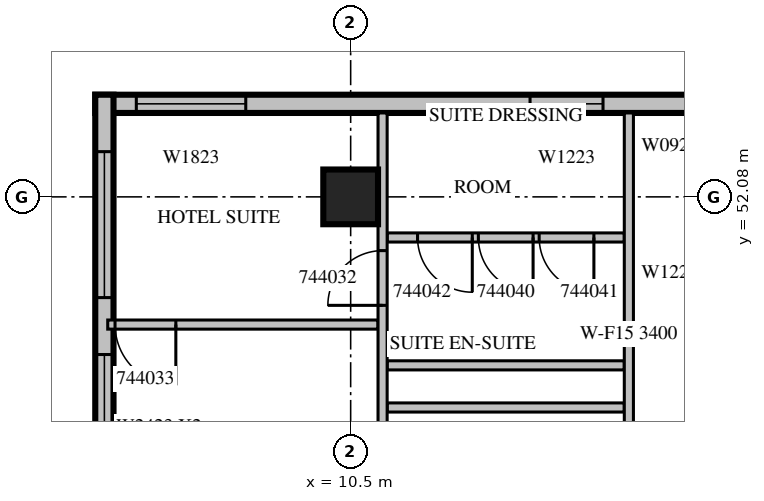
"""IFC4 building model, lengths in metres.
Left out: names, types, materials, properties, quantities, classifications, styles, units other than length and angle.
Written with IfcOpenShell. Run it as: python <this file> out.ifc"""

import sys

from ifc_helpers import new_model, si_unit, direction, frame, frame_2d, origin, origin_2d, place, context, subcontext, project, spatial, rectangle, extrude, source, transform, mapped, element, fill, save


model = new_model("IFC4")
c1 = context("Model", 3, precision=1e-05, world=origin(), true_north=direction((0.0, 1.0)))
c2 = subcontext(c1, "Body", "Model", "MODEL_VIEW")
j1 = project(units=[si_unit("LENGTHUNIT", "METRE"), si_unit("PLANEANGLEUNIT", "RADIAN")], contexts=[c1])
p1 = place(None, origin())
s1 = spatial("IfcSite", under=j1, at=p1, CompositionType="ELEMENT")
p2 = place(p1, origin())
s2 = spatial("IfcBuilding", under=s1, at=p2, CompositionType="ELEMENT")
p3 = place(p2, frame((0.0, 0.0, 200.6)))
s3 = spatial("IfcBuildingStorey", under=s2, at=p3, CompositionType="ELEMENT", Elevation=200.6)
m1 = source(origin(), c2, "Body", "SweptSolid", [
    extrude(rectangle(XDim=0.9, YDim=0.9, at=origin_2d()), origin(), (0.0, 0.0, 1.0), 3.8),
])
p4 = place(p3, frame((10.5, 52.08, 0.0), z_axis=(0.0, 0.0, 1.0), x_axis=(1.0, 0.0, 0.0)))
e1 = element("IfcColumn", 1, at=p4, inside=s3, PredefinedType="COLUMN", context=c2, shape_type="MappedRepresentation", body=[
    mapped(m1, transform((0.0, 0.0, 0.0), scale=1.0)),
])
m2 = source(origin(), c2, "Body", "SweptSolid", [
    extrude(rectangle(XDim=10.5, YDim=0.3, at=frame_2d((5.25, 0.0))), origin(), (0.0, 0.0, 1.0), 3.4),
])
p5 = place(p3, frame((16.8, 53.61, 0.0), z_axis=(0.0, 0.0, 1.0), x_axis=(-1.0, 0.0, 0.0)))
e2 = element("IfcWall", 2, at=p5, inside=s3, PredefinedType="STANDARD", context=c2, shape_type="MappedRepresentation", body=[
    mapped(m2, transform((0.0, 0.0, 0.0), scale=1.0)),
])
m3 = source(origin(), c2, "Body", "SweptSolid", [
    extrude(rectangle(XDim=1.2, YDim=2.3, at=frame_2d((0.6, 1.15))), frame((0.0, 0.16, 0.0), z_axis=(0.0, -1.0, 0.0), x_axis=(1.0, 0.0, 0.0)), (0.0, 0.0, 1.0), 0.32),
])
p6 = place(p5, frame((2.15, 0.0, 0.6)))
e3 = element("IfcOpeningElement", 3, at=p6, cuts=e2, PredefinedType="OPENING", context=c2, shape_type="MappedRepresentation", body=[
    mapped(m3, transform((0.0, 0.0, 0.0), scale=1.0)),
])
m4 = source(origin(), c2, "Body", "SweptSolid", [
    extrude(rectangle(XDim=1.8, YDim=2.3, at=frame_2d((0.9, 1.15))), frame((0.0, 0.16, 0.0), z_axis=(0.0, -1.0, 0.0), x_axis=(1.0, 0.0, 0.0)), (0.0, 0.0, 1.0), 0.32),
])
p7 = place(p5, frame((8.025, 0.0, 0.6)))
e4 = element("IfcOpeningElement", 4, at=p7, cuts=e2, PredefinedType="OPENING", context=c2, shape_type="MappedRepresentation", body=[
    mapped(m4, transform((0.0, 0.0, 0.0), scale=1.0)),
])
m5 = source(origin(), c2, "Body", "SweptSolid", [
    extrude(rectangle(XDim=9.91, YDim=0.3, at=frame_2d((4.955, 0.0))), origin(), (0.0, 0.0, 1.0), 3.4),
])
p8 = place(p3, frame((6.45, 53.76, 0.0), z_axis=(0.0, 0.0, 1.0), x_axis=(0.0, -1.0, 0.0)))
e5 = element("IfcWall", 5, at=p8, inside=s3, PredefinedType="STANDARD", context=c2, shape_type="MappedRepresentation", body=[
    mapped(m5, transform((0.0, 0.0, 0.0), scale=1.0)),
])
m6 = source(origin(), c2, "Body", "SweptSolid", [
    extrude(rectangle(XDim=2.4, YDim=2.3, at=frame_2d((1.2, 1.15))), frame((0.0, 0.16, 0.0), z_axis=(0.0, -1.0, 0.0), x_axis=(1.0, 0.0, 0.0)), (0.0, 0.0, 1.0), 0.32),
])
p9 = place(p8, frame((4.272, 0.0, 0.6)))
e6 = element("IfcOpeningElement", 6, at=p9, cuts=e5, PredefinedType="OPENING", context=c2, shape_type="MappedRepresentation", body=[
    mapped(m6, transform((0.0, 0.0, 0.0), scale=1.0)),
])
p10 = place(p8, frame((0.936, 0.0, 0.6)))
e7 = element("IfcOpeningElement", 7, at=p10, cuts=e5, PredefinedType="OPENING", context=c2, shape_type="MappedRepresentation", body=[
    mapped(m6, transform((0.0, 0.0, 0.0), scale=1.0)),
])
m7 = source(origin(), c2, "Body", "SweptSolid", [
    extrude(rectangle(XDim=4.445, YDim=0.15, at=frame_2d((2.223, 0.0))), origin(), (0.0, 0.0, 1.0), 3.4),
])
p11 = place(p3, frame((10.95, 49.98, 0.0), z_axis=(0.0, 0.0, 1.0), x_axis=(-1.0, 0.0, 0.0)))
e8 = element("IfcWall", 8, at=p11, inside=s3, PredefinedType="PARTITIONING", context=c2, shape_type="MappedRepresentation", body=[
    mapped(m7, transform((0.0, 0.0, 0.0), scale=1.0)),
])
m8 = source(origin(), c2, "Body", "SweptSolid", [
    extrude(rectangle(XDim=1.0, YDim=2.1, at=frame_2d((0.5, 1.05))), frame((0.0, 0.085, 0.0), z_axis=(0.0, -1.0, 0.0), x_axis=(1.0, 0.0, 0.0)), (0.0, 0.0, 1.0), 0.17),
])
p12 = place(p11, frame((3.325, 0.0, 0.0)))
e9 = element("IfcOpeningElement", 9, at=p12, cuts=e8, PredefinedType="OPENING", context=c2, shape_type="MappedRepresentation", body=[
    mapped(m8, transform((0.0, 0.0, 0.0), scale=1.0)),
])
m9 = source(origin(), c2, "Body", "SweptSolid", [
    extrude(rectangle(XDim=3.9, YDim=0.15, at=frame_2d((1.95, 0.0))), origin(), (0.0, 0.0, 1.0), 3.4),
])
for number, where, z_axis, x_axis in (
    (10, (15.0, 48.617, 0.0), (0.0, 0.0, 1.0), (-1.0, 0.0, 0.0)),
    (11, (15.0, 49.309, 0.0), (0.0, 0.0, 1.0), (-1.0, 0.0, 0.0)),
):
    element("IfcWall", number, at=place(p3, frame(where, z_axis=z_axis, x_axis=x_axis)), inside=s3, PredefinedType="PARTITIONING", context=c2, shape_type="MappedRepresentation", body=[
        mapped(m9, transform((0.0, 0.0, 0.0), scale=1.0)),
    ])
p13 = place(p3, frame((15.0, 51.412, 0.0), z_axis=(0.0, 0.0, 1.0), x_axis=(-1.0, 0.0, 0.0)))
e12 = element("IfcWall", 12, at=p13, inside=s3, PredefinedType="PARTITIONING", context=c2, shape_type="MappedRepresentation", body=[
    mapped(m9, transform((0.0, 0.0, 0.0), scale=1.0)),
])
m10 = source(origin(), c2, "Body", "SweptSolid", [
    extrude(rectangle(XDim=0.9, YDim=2.1, at=frame_2d((0.45, 1.05))), frame((0.0, 0.085, 0.0), z_axis=(0.0, -1.0, 0.0), x_axis=(1.0, 0.0, 0.0)), (0.0, 0.0, 1.0), 0.17),
])
p14 = place(p13, frame((1.5, 0.0, 0.0)))
e13 = element("IfcOpeningElement", 13, at=p14, cuts=e12, PredefinedType="OPENING", context=c2, shape_type="MappedRepresentation", body=[
    mapped(m10, transform((0.0, 0.0, 0.0), scale=1.0)),
])
p15 = place(p13, frame((0.5, 0.0, 0.0)))
e14 = element("IfcOpeningElement", 14, at=p15, cuts=e12, PredefinedType="OPENING", context=c2, shape_type="MappedRepresentation", body=[
    mapped(m10, transform((0.0, 0.0, 0.0), scale=1.0)),
])
p16 = place(p13, frame((2.5, 0.0, 0.0)))
e15 = element("IfcOpeningElement", 15, at=p16, cuts=e12, PredefinedType="OPENING", context=c2, shape_type="MappedRepresentation", body=[
    mapped(m10, transform((0.0, 0.0, 0.0), scale=1.0)),
])
m11 = source(origin(), c2, "Body", "SweptSolid", [
    extrude(rectangle(XDim=7.26, YDim=0.15, at=frame_2d((3.63, 0.0))), origin(), (0.0, 0.0, 1.0), 3.4),
])
p17 = place(p3, frame((11.025, 46.2, 0.0), z_axis=(0.0, 0.0, 1.0), x_axis=(0.0, 1.0, 0.0)))
e16 = element("IfcWall", 16, at=p17, inside=s3, PredefinedType="PARTITIONING", context=c2, shape_type="MappedRepresentation", body=[
    mapped(m11, transform((0.0, 0.0, 0.0), scale=1.0)),
])
m12 = source(origin(), c2, "Body", "SweptSolid", [
    extrude(rectangle(XDim=1.1, YDim=2.1, at=frame_2d((0.55, 1.05))), frame((0.0, 0.085, 0.0), z_axis=(0.0, -1.0, 0.0), x_axis=(1.0, 0.0, 0.0)), (0.0, 0.0, 1.0), 0.17),
])
p18 = place(p17, frame((0.896, 0.0, 0.0)))
e17 = element("IfcOpeningElement", 17, at=p18, cuts=e16, PredefinedType="OPENING", context=c2, shape_type="MappedRepresentation", body=[
    mapped(m12, transform((0.0, 0.0, 0.0), scale=1.0)),
])
p19 = place(p17, frame((4.096, 0.0, 0.0)))
e18 = element("IfcOpeningElement", 18, at=p19, cuts=e16, PredefinedType="OPENING", context=c2, shape_type="MappedRepresentation", body=[
    mapped(m10, transform((0.0, 0.0, 0.0), scale=1.0)),
])
p20 = place(p3, frame((15.075, 46.2, 0.0), z_axis=(0.0, 0.0, 1.0), x_axis=(0.0, 1.0, 0.0)))
e19 = element("IfcWall", 19, at=p20, inside=s3, PredefinedType="PARTITIONING", context=c2, shape_type="MappedRepresentation", body=[
    mapped(m11, transform((0.0, 0.0, 0.0), scale=1.0)),
])
p21 = place(p20, frame((0.658, 0.0, 0.0)))
e20 = element("IfcOpeningElement", 20, at=p21, cuts=e19, PredefinedType="OPENING", context=c2, shape_type="MappedRepresentation", body=[
    mapped(m12, transform((0.0, 0.0, 0.0), scale=1.0)),
])
m13 = source(origin(), c2, "Body", "SweptSolid", [
    extrude(rectangle(XDim=1.2, YDim=2.3, at=frame_2d((0.6, 1.15))), frame((0.0, 0.03, 0.0), z_axis=(0.0, -1.0, 0.0), x_axis=(1.0, 0.0, 0.0)), (0.0, 0.0, 1.0), 0.06),
])
p22 = place(p6, origin())
e21 = element("IfcWindow", 21, at=p22, inside=s3, PartitioningType="SINGLE_PANEL", PredefinedType="WINDOW", context=c2, shape_type="MappedRepresentation", body=[
    mapped(m13, transform((0.0, 0.0, 0.0), scale=1.0)),
])
fill(e3, e21)
m14 = source(origin(), c2, "Body", "SweptSolid", [
    extrude(rectangle(XDim=1.8, YDim=2.3, at=frame_2d((0.9, 1.15))), frame((0.0, 0.03, 0.0), z_axis=(0.0, -1.0, 0.0), x_axis=(1.0, 0.0, 0.0)), (0.0, 0.0, 1.0), 0.06),
])
p23 = place(p7, origin())
e22 = element("IfcWindow", 22, at=p23, inside=s3, PartitioningType="SINGLE_PANEL", PredefinedType="WINDOW", context=c2, shape_type="MappedRepresentation", body=[
    mapped(m14, transform((0.0, 0.0, 0.0), scale=1.0)),
])
fill(e4, e22)
m15 = source(origin(), c2, "Body", "SweptSolid", [
    extrude(rectangle(XDim=2.4, YDim=2.3, at=frame_2d((1.2, 1.15))), frame((0.0, 0.03, 0.0), z_axis=(0.0, -1.0, 0.0), x_axis=(1.0, 0.0, 0.0)), (0.0, 0.0, 1.0), 0.06),
])
p24 = place(p9, origin())
e23 = element("IfcWindow", 23, at=p24, inside=s3, PartitioningType="SINGLE_PANEL", PredefinedType="WINDOW", context=c2, shape_type="MappedRepresentation", body=[
    mapped(m15, transform((0.0, 0.0, 0.0), scale=1.0)),
])
fill(e6, e23)
p25 = place(p10, origin())
e24 = element("IfcWindow", 24, at=p25, inside=s3, PartitioningType="SINGLE_PANEL", PredefinedType="WINDOW", context=c2, shape_type="MappedRepresentation", body=[
    mapped(m15, transform((0.0, 0.0, 0.0), scale=1.0)),
])
fill(e7, e24)
m16 = source(origin(), c2, "Body", "SweptSolid", [
    extrude(rectangle(XDim=0.9, YDim=2.1, at=frame_2d((0.45, 1.05))), frame((0.0, 0.025, 0.0), z_axis=(0.0, -1.0, 0.0), x_axis=(1.0, 0.0, 0.0)), (0.0, 0.0, 1.0), 0.05),
])
p26 = place(p19, origin())
e25 = element("IfcDoor", 25, at=p26, inside=s3, OperationType="SINGLE_SWING_LEFT", PredefinedType="DOOR", context=c2, shape_type="MappedRepresentation", body=[
    mapped(m16, transform((0.0, 0.0, 0.0), scale=1.0)),
])
fill(e18, e25)
m17 = source(origin(), c2, "Body", "SweptSolid", [
    extrude(rectangle(XDim=1.0, YDim=2.1, at=frame_2d((0.5, 1.05))), frame((0.0, 0.025, 0.0), z_axis=(0.0, -1.0, 0.0), x_axis=(1.0, 0.0, 0.0)), (0.0, 0.0, 1.0), 0.05),
])
p27 = place(p12, origin())
e26 = element("IfcDoor", 26, at=p27, inside=s3, OperationType="SINGLE_SWING_LEFT", PredefinedType="DOOR", context=c2, shape_type="MappedRepresentation", body=[
    mapped(m17, transform((0.0, 0.0, 0.0), scale=1.0)),
])
fill(e9, e26)
p28 = place(p14, origin())
e27 = element("IfcDoor", 27, at=p28, inside=s3, OperationType="SINGLE_SWING_LEFT", PredefinedType="DOOR", context=c2, shape_type="MappedRepresentation", body=[
    mapped(m16, transform((0.0, 0.0, 0.0), scale=1.0)),
])
fill(e13, e27)
p29 = place(p15, origin())
e28 = element("IfcDoor", 28, at=p29, inside=s3, OperationType="SINGLE_SWING_LEFT", PredefinedType="DOOR", context=c2, shape_type="MappedRepresentation", body=[
    mapped(m16, transform((0.0, 0.0, 0.0), scale=1.0)),
])
fill(e14, e28)
p30 = place(p16, origin())
e29 = element("IfcDoor", 29, at=p30, inside=s3, OperationType="SINGLE_SWING_LEFT", PredefinedType="DOOR", context=c2, shape_type="MappedRepresentation", body=[
    mapped(m16, transform((0.0, 0.0, 0.0), scale=1.0)),
])
fill(e15, e29)
save(model, sys.argv[1])
